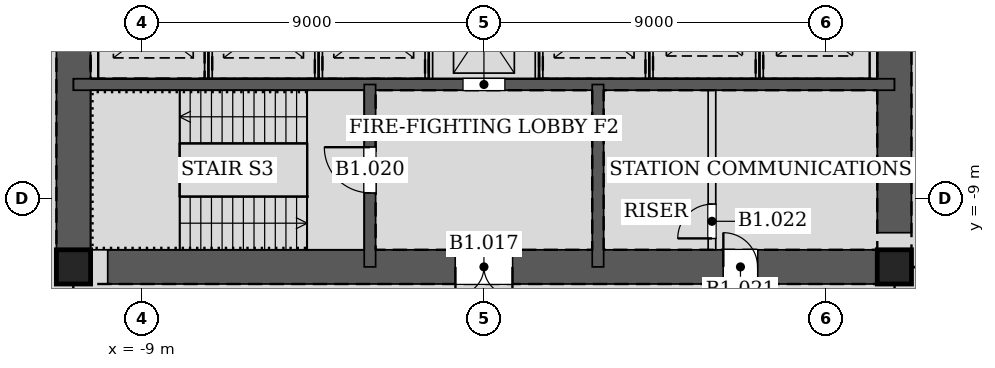
"""IFC4 building model, lengths in metres.
Left out: names, types, materials, properties, quantities, classifications, styles, units other than length and angle.
Written with IfcOpenShell. Run it as: python <this file> out.ifc"""

import sys

from ifc_helpers import new_model, si_unit, direction, frame, frame_2d, origin, origin_2d, place, context, subcontext, project, spatial, rectangle, hollow_rectangle, extrude, element, fill, save


model = new_model("IFC4")
c1 = context("Model", 3, precision=1e-05, world=origin(), true_north=direction((0.0, 1.0)))
c2 = subcontext(c1, "Body", "Model", "MODEL_VIEW")
j1 = project(units=[si_unit("LENGTHUNIT", "METRE"), si_unit("PLANEANGLEUNIT", "RADIAN")], contexts=[c1])
p1 = place(None, origin())
s1 = spatial("IfcSite", under=j1, at=p1, CompositionType="ELEMENT")
p2 = place(p1, origin())
s2 = spatial("IfcBuilding", under=s1, at=p2, CompositionType="ELEMENT")
p3 = place(p2, frame((0.0, 0.0, -4.5)))
s3 = spatial("IfcBuildingStorey", under=s2, at=p3, CompositionType="ELEMENT", Elevation=-4.5)
for number, where, z_axis, x_axis in (
    (1, (-10.8, -10.8, 0.0), (0.0, 0.0, 1.0), (1.0, 0.0, 0.0)),
    (2, (10.8, -10.8, 0.0), (0.0, 0.0, 1.0), (1.0, 0.0, 0.0)),
):
    element("IfcColumn", number, at=place(p3, frame(where, z_axis=z_axis, x_axis=x_axis)), inside=s3, PredefinedType="COLUMN", context=c2, shape_type="SweptSolid", body=[
        extrude(hollow_rectangle(XDim=0.9, YDim=0.9, WallThickness=0.06, at=origin_2d()), origin(), (0.0, 0.0, 1.0), 4.5),
    ])
p4 = place(p3, frame((-10.8, -10.8, 0.0), z_axis=(0.0, 0.0, 1.0), x_axis=(1.0, 0.0, 0.0)))
e3 = element("IfcWall", 3, at=p4, inside=s3, PredefinedType="SOLIDWALL", context=c2, shape_type="SweptSolid", body=[
    extrude(rectangle(XDim=21.6, YDim=0.9, at=frame_2d((10.8, 0.0))), origin(), (0.0, 0.0, 1.0), 4.5),
])
p5 = place(p4, frame((10.05, 0.0, 0.0)))
e4 = element("IfcOpeningElement", 4, at=p5, cuts=e3, PredefinedType="OPENING", context=c2, shape_type="SweptSolid", body=[
    extrude(rectangle(XDim=1.5, YDim=2.1, at=frame_2d((0.75, 1.05))), frame((0.0, 0.46, 0.0), z_axis=(0.0, -1.0, 0.0), x_axis=(1.0, 0.0, 0.0)), (0.0, 0.0, 1.0), 0.92),
])
p6 = place(p4, frame((17.1, 0.0, 0.0)))
e5 = element("IfcOpeningElement", 5, at=p6, cuts=e3, PredefinedType="OPENING", context=c2, shape_type="SweptSolid", body=[
    extrude(rectangle(XDim=0.9, YDim=2.1, at=frame_2d((0.45, 1.05))), frame((0.0, 0.46, 0.0), z_axis=(0.0, -1.0, 0.0), x_axis=(1.0, 0.0, 0.0)), (0.0, 0.0, 1.0), 0.92),
])
p7 = place(p3, frame((10.8, -10.8, 0.0), z_axis=(0.0, 0.0, 1.0), x_axis=(0.0, 1.0, 0.0)))
e6 = element("IfcWall", 6, at=p7, inside=s3, PredefinedType="SOLIDWALL", context=c2, shape_type="SweptSolid", body=[
    extrude(rectangle(XDim=21.6, YDim=0.9, at=frame_2d((10.8, 0.0))), origin(), (0.0, 0.0, 1.0), 4.5),
])
p8 = place(p7, frame((11.7, 0.0, 0.0)))
e7 = element("IfcOpeningElement", 7, at=p8, cuts=e6, PredefinedType="OPENING", context=c2, shape_type="SweptSolid", body=[
    extrude(rectangle(XDim=1.2, YDim=2.1, at=frame_2d((0.6, 1.05))), frame((0.0, 0.46, 0.0), z_axis=(0.0, -1.0, 0.0), x_axis=(1.0, 0.0, 0.0)), (0.0, 0.0, 1.0), 0.92),
])
p9 = place(p7, frame((8.7, 0.0, 0.0)))
e8 = element("IfcOpeningElement", 8, at=p9, cuts=e6, PredefinedType="OPENING", context=c2, shape_type="SweptSolid", body=[
    extrude(rectangle(XDim=1.2, YDim=2.1, at=frame_2d((0.6, 1.05))), frame((0.0, 0.46, 0.0), z_axis=(0.0, -1.0, 0.0), x_axis=(1.0, 0.0, 0.0)), (0.0, 0.0, 1.0), 0.92),
])
p10 = place(p3, frame((-10.8, 10.8, 0.0), z_axis=(0.0, 0.0, 1.0), x_axis=(0.0, -1.0, 0.0)))
e9 = element("IfcWall", 9, at=p10, inside=s3, PredefinedType="SOLIDWALL", context=c2, shape_type="SweptSolid", body=[
    extrude(rectangle(XDim=21.6, YDim=0.9, at=frame_2d((10.8, 0.0))), origin(), (0.0, 0.0, 1.0), 4.5),
])
p11 = place(p10, frame((8.7, 0.0, 0.0)))
e10 = element("IfcOpeningElement", 10, at=p11, cuts=e9, PredefinedType="OPENING", context=c2, shape_type="SweptSolid", body=[
    extrude(rectangle(XDim=1.2, YDim=2.1, at=frame_2d((0.6, 1.05))), frame((0.0, 0.46, 0.0), z_axis=(0.0, -1.0, 0.0), x_axis=(1.0, 0.0, 0.0)), (0.0, 0.0, 1.0), 0.92),
])
p12 = place(p10, frame((11.7, 0.0, 0.0)))
e11 = element("IfcOpeningElement", 11, at=p12, cuts=e9, PredefinedType="OPENING", context=c2, shape_type="SweptSolid", body=[
    extrude(rectangle(XDim=1.2, YDim=2.1, at=frame_2d((0.6, 1.05))), frame((0.0, 0.46, 0.0), z_axis=(0.0, -1.0, 0.0), x_axis=(1.0, 0.0, 0.0)), (0.0, 0.0, 1.0), 0.92),
])
p13 = place(p3, frame((-10.8, -6.0, 0.0), z_axis=(0.0, 0.0, 1.0), x_axis=(1.0, 0.0, 0.0)))
e12 = element("IfcWall", 12, at=p13, inside=s3, PredefinedType="SOLIDWALL", context=c2, shape_type="SweptSolid", body=[
    extrude(rectangle(XDim=21.6, YDim=0.3, at=frame_2d((10.8, 0.0))), origin(), (0.0, 0.0, 1.0), 2.7),
])
p14 = place(p13, frame((10.25, 0.0, 0.0)))
e13 = element("IfcOpeningElement", 13, at=p14, cuts=e12, PredefinedType="OPENING", context=c2, shape_type="SweptSolid", body=[
    extrude(rectangle(XDim=1.1, YDim=2.1, at=frame_2d((0.55, 1.05))), frame((0.0, 0.16, 0.0), z_axis=(0.0, -1.0, 0.0), x_axis=(1.0, 0.0, 0.0)), (0.0, 0.0, 1.0), 0.32),
])
p15 = place(p3, frame((-10.8, -6.0, 2.7), z_axis=(0.0, 0.0, 1.0), x_axis=(1.0, 0.0, 0.0)))
e14 = element("IfcWall", 14, at=p15, inside=s3, PredefinedType="SOLIDWALL", context=c2, shape_type="SweptSolid", body=[
    extrude(rectangle(XDim=21.6, YDim=0.3, at=frame_2d((10.8, 0.0))), origin(), (0.0, 0.0, 1.0), 1.8),
])
p16 = place(p3, frame((-3.0, -6.0, 0.0), z_axis=(0.0, 0.0, 1.0), x_axis=(0.0, -1.0, 0.0)))
e15 = element("IfcWall", 15, at=p16, inside=s3, PredefinedType="SOLIDWALL", context=c2, shape_type="SweptSolid", body=[
    extrude(rectangle(XDim=4.8, YDim=0.3, at=frame_2d((2.4, 0.0))), origin(), (0.0, 0.0, 1.0), 4.5),
])
p17 = place(p16, frame((1.65, 0.0, 0.0)))
e16 = element("IfcOpeningElement", 16, at=p17, cuts=e15, PredefinedType="OPENING", context=c2, shape_type="SweptSolid", body=[
    extrude(rectangle(XDim=1.2, YDim=2.1, at=frame_2d((0.6, 1.05))), frame((0.0, 0.16, 0.0), z_axis=(0.0, -1.0, 0.0), x_axis=(1.0, 0.0, 0.0)), (0.0, 0.0, 1.0), 0.32),
])
p18 = place(p3, frame((3.0, -6.0, 0.0), z_axis=(0.0, 0.0, 1.0), x_axis=(0.0, -1.0, 0.0)))
e17 = element("IfcWall", 17, at=p18, inside=s3, PredefinedType="SOLIDWALL", context=c2, shape_type="SweptSolid", body=[
    extrude(rectangle(XDim=4.8, YDim=0.3, at=frame_2d((2.4, 0.0))), origin(), (0.0, 0.0, 1.0), 4.5),
])
for number, where, z_axis, x_axis in (
    (18, (-7.25, -5.85, 0.0), (0.0, 0.0, 1.0), (0.0, 1.0, 0.0)),
    (19, (-4.35, -5.85, 0.0), (0.0, 0.0, 1.0), (0.0, 1.0, 0.0)),
    (20, (-1.45, -5.85, 0.0), (0.0, 0.0, 1.0), (0.0, 1.0, 0.0)),
    (21, (1.45, -5.85, 0.0), (0.0, 0.0, 1.0), (0.0, 1.0, 0.0)),
    (22, (4.35, -5.85, 0.0), (0.0, 0.0, 1.0), (0.0, 1.0, 0.0)),
    (23, (7.25, -5.85, 0.0), (0.0, 0.0, 1.0), (0.0, 1.0, 0.0)),
):
    element("IfcWall", number, at=place(p3, frame(where, z_axis=z_axis, x_axis=x_axis)), inside=s3, PredefinedType="PARTITIONING", context=c2, shape_type="SweptSolid", body=[
        extrude(rectangle(XDim=2.7, YDim=0.2, at=frame_2d((1.35, 0.0))), origin(), (0.0, 0.0, 1.0), 4.5),
    ])
p19 = place(p3, frame((6.0, -10.35, 0.0), z_axis=(0.0, 0.0, 1.0), x_axis=(0.0, 1.0, 0.0)))
e24 = element("IfcWall", 24, at=p19, inside=s3, PredefinedType="PARTITIONING", context=c2, shape_type="SweptSolid", body=[
    extrude(rectangle(XDim=4.2, YDim=0.2, at=frame_2d((2.1, 0.0))), origin(), (0.0, 0.0, 1.0), 4.2),
])
p20 = place(p19, frame((0.3, 0.0, 0.0)))
e25 = element("IfcOpeningElement", 25, at=p20, cuts=e24, PredefinedType="OPENING", context=c2, shape_type="SweptSolid", body=[
    extrude(rectangle(XDim=0.9, YDim=2.1, at=frame_2d((0.45, 1.05))), frame((0.0, 0.11, 0.0), z_axis=(0.0, -1.0, 0.0), x_axis=(1.0, 0.0, 0.0)), (0.0, 0.0, 1.0), 0.22),
])
p21 = place(p5, frame((1.5, 0.0, 0.0), z_axis=(0.0, 0.0, 1.0), x_axis=(-1.0, 0.0, 0.0)))
e26 = element("IfcDoor", 26, at=p21, inside=s3, OperationType="DOUBLE_DOOR_SINGLE_SWING", PredefinedType="DOOR", context=c2, shape_type="SweptSolid", body=[
    extrude(rectangle(XDim=1.5, YDim=2.1, at=frame_2d((0.75, 1.05))), frame((0.0, 0.025, 0.0), z_axis=(0.0, -1.0, 0.0), x_axis=(1.0, 0.0, 0.0)), (0.0, 0.0, 1.0), 0.05),
])
fill(e4, e26)
p22 = place(p17, frame((1.2, 0.0, 0.0), z_axis=(0.0, 0.0, 1.0), x_axis=(-1.0, 0.0, 0.0)))
e27 = element("IfcDoor", 27, at=p22, inside=s3, OperationType="SINGLE_SWING_RIGHT", PredefinedType="DOOR", context=c2, shape_type="SweptSolid", body=[
    extrude(rectangle(XDim=1.2, YDim=2.1, at=frame_2d((0.6, 1.05))), frame((0.0, 0.025, 0.0), z_axis=(0.0, -1.0, 0.0), x_axis=(1.0, 0.0, 0.0)), (0.0, 0.0, 1.0), 0.05),
])
fill(e16, e27)
p23 = place(p6, origin())
e28 = element("IfcDoor", 28, at=p23, inside=s3, OperationType="SINGLE_SWING_LEFT", PredefinedType="DOOR", context=c2, shape_type="SweptSolid", body=[
    extrude(rectangle(XDim=0.9, YDim=2.1, at=frame_2d((0.45, 1.05))), frame((0.0, 0.025, 0.0), z_axis=(0.0, -1.0, 0.0), x_axis=(1.0, 0.0, 0.0)), (0.0, 0.0, 1.0), 0.05),
])
fill(e5, e28)
p24 = place(p20, origin())
e29 = element("IfcDoor", 29, at=p24, inside=s3, OperationType="SINGLE_SWING_LEFT", PredefinedType="DOOR", context=c2, shape_type="SweptSolid", body=[
    extrude(rectangle(XDim=0.9, YDim=2.1, at=frame_2d((0.45, 1.05))), frame((0.0, 0.025, 0.0), z_axis=(0.0, -1.0, 0.0), x_axis=(1.0, 0.0, 0.0)), (0.0, 0.0, 1.0), 0.05),
])
fill(e25, e29)
p25 = place(p14, origin())
e30 = element("IfcDoor", 30, at=p25, inside=s3, OperationType="DOUBLE_DOOR_SLIDING", PredefinedType="DOOR", context=c2, shape_type="SweptSolid", body=[
    extrude(rectangle(XDim=1.1, YDim=2.1, at=frame_2d((0.55, 1.05))), frame((0.0, 0.025, 0.0), z_axis=(0.0, -1.0, 0.0), x_axis=(1.0, 0.0, 0.0)), (0.0, 0.0, 1.0), 0.05),
])
fill(e13, e30)
save(model, sys.argv[1])
